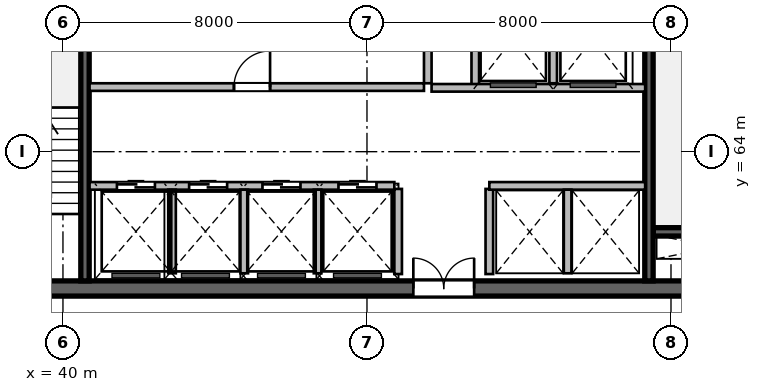
"""IFC4 building model, lengths in metres.
Left out: names, types, materials, properties, quantities, classifications, styles, units other than length and angle.
Written with IfcOpenShell. Run it as: python <this file> out.ifc"""

import sys

from ifc_helpers import new_model, si_unit, direction, frame, frame_2d, origin, place, context, subcontext, project, spatial, rectangle, extrude, source, transform, mapped, element, fill, save


model = new_model("IFC4")
c1 = context("Model", 3, precision=1e-05, world=origin(), true_north=direction((0.0, 1.0)))
c2 = subcontext(c1, "Body", "Model", "MODEL_VIEW")
j1 = project(units=[si_unit("LENGTHUNIT", "METRE"), si_unit("PLANEANGLEUNIT", "RADIAN")], contexts=[c1])
p1 = place(None, origin())
s1 = spatial("IfcSite", under=j1, at=p1, CompositionType="ELEMENT")
p2 = place(p1, origin())
s2 = spatial("IfcBuilding", under=s1, at=p2, CompositionType="ELEMENT")
p3 = place(p2, frame((0.0, 0.0, 291.3)))
s3 = spatial("IfcBuildingStorey", under=s2, at=p3, CompositionType="ELEMENT", Elevation=291.3)
m1 = source(origin(), c2, "Body", "SweptSolid", [
    extrude(rectangle(XDim=21.6, YDim=0.4, at=frame_2d((10.8, 0.0))), origin(), (0.0, 0.0, 1.0), 3.9),
])
p4 = place(p3, frame((37.2, 60.4, 0.0), z_axis=(0.0, 0.0, 1.0), x_axis=(1.0, 0.0, 0.0)))
e1 = element("IfcWall", 1, at=p4, inside=s3, PredefinedType="SHEAR", context=c2, shape_type="MappedRepresentation", body=[
    mapped(m1, transform((0.0, 0.0, 0.0), scale=1.0)),
])
p5 = place(p4, frame((1.1, 0.0, 0.0)))
e2 = element("IfcOpeningElement", 2, at=p5, cuts=e1, PredefinedType="OPENING", context=c2, shape_type="SweptSolid", body=[
    extrude(rectangle(XDim=1.15, YDim=2.15, at=frame_2d((0.575, 1.075))), frame((0.0, 0.21, 0.0), z_axis=(0.0, -1.0, 0.0), x_axis=(1.0, 0.0, 0.0)), (0.0, 0.0, 1.0), 0.42),
])
p6 = place(p4, frame((19.5, 0.0, 0.0)))
e3 = element("IfcOpeningElement", 3, at=p6, cuts=e1, PredefinedType="OPENING", context=c2, shape_type="SweptSolid", body=[
    extrude(rectangle(XDim=0.9, YDim=2.1, at=frame_2d((0.45, 1.05))), frame((0.0, 0.21, 0.0), z_axis=(0.0, -1.0, 0.0), x_axis=(1.0, 0.0, 0.0)), (0.0, 0.0, 1.0), 0.42),
])
p7 = place(p4, frame((12.02, 0.0, 0.0)))
e4 = element("IfcOpeningElement", 4, at=p7, cuts=e1, PredefinedType="OPENING", context=c2, shape_type="SweptSolid", body=[
    extrude(rectangle(XDim=1.6, YDim=2.15, at=frame_2d((0.8, 1.075))), frame((0.0, 0.21, 0.0), z_axis=(0.0, -1.0, 0.0), x_axis=(1.0, 0.0, 0.0)), (0.0, 0.0, 1.0), 0.42),
])
m2 = source(origin(), c2, "Body", "SweptSolid", [
    extrude(rectangle(XDim=3.27, YDim=0.22, at=frame_2d((1.635, 0.0))), origin(), (0.0, 0.0, 1.0), 3.9),
])
p8 = place(p3, frame((55.53, 61.89, 0.0), z_axis=(0.0, 0.0, 1.0), x_axis=(1.0, 0.0, 0.0)))
e5 = element("IfcWall", 5, at=p8, inside=s3, PredefinedType="SHEAR", context=c2, shape_type="MappedRepresentation", body=[
    mapped(m2, transform((0.0, 0.0, 0.0), scale=1.0)),
])
m3 = source(origin(), c2, "Body", "SweptSolid", [
    extrude(rectangle(XDim=11.2, YDim=0.22, at=frame_2d((5.6, 0.0))), origin(), (0.0, 0.0, 1.0), 3.9),
])
p9 = place(p3, frame((40.58, 60.6, 0.0), z_axis=(0.0, 0.0, 1.0), x_axis=(0.0, 1.0, 0.0)))
e6 = element("IfcWall", 6, at=p9, inside=s3, PredefinedType="SHEAR", context=c2, shape_type="MappedRepresentation", body=[
    mapped(m3, transform((0.0, 0.0, 0.0), scale=1.0)),
])
p10 = place(p3, frame((55.42, 60.6, 0.0), z_axis=(0.0, 0.0, 1.0), x_axis=(0.0, 1.0, 0.0)))
e7 = element("IfcWall", 7, at=p10, inside=s3, PredefinedType="SHEAR", context=c2, shape_type="MappedRepresentation", body=[
    mapped(m3, transform((0.0, 0.0, 0.0), scale=1.0)),
])
p11 = place(p10, frame((9.645, 0.0, 0.0)))
e8 = element("IfcOpeningElement", 8, at=p11, cuts=e7, PredefinedType="OPENING", context=c2, shape_type="SweptSolid", body=[
    extrude(rectangle(XDim=1.15, YDim=2.15, at=frame_2d((0.575, 1.075))), frame((0.0, 0.12, 0.0), z_axis=(0.0, -1.0, 0.0), x_axis=(1.0, 0.0, 0.0)), (0.0, 0.0, 1.0), 0.24),
])
m4 = source(origin(), c2, "Body", "SweptSolid", [
    extrude(rectangle(XDim=2.24, YDim=0.2, at=frame_2d((1.12, 0.0))), origin(), (0.0, 0.0, 1.0), 3.64),
])
for number, where, z_axis, x_axis in (
    (9, (48.82, 60.78, 0.0), (0.0, 0.0, 1.0), (0.0, 1.0, 0.0)),
    (10, (51.22, 60.78, 0.0), (0.0, 0.0, 1.0), (0.0, 1.0, 0.0)),
):
    element("IfcWall", number, at=place(p3, frame(where, z_axis=z_axis, x_axis=x_axis)), inside=s3, PredefinedType="SOLIDWALL", context=c2, shape_type="MappedRepresentation", body=[
        mapped(m4, transform((0.0, 0.0, 0.0), scale=1.0)),
    ])
m5 = source(origin(), c2, "Body", "SweptSolid", [
    extrude(rectangle(XDim=5.8, YDim=0.2, at=frame_2d((2.9, 0.0))), origin(), (0.0, 0.0, 1.0), 3.64),
])
p12 = place(p3, frame((49.6, 65.8, 0.0), z_axis=(0.0, 0.0, 1.0), x_axis=(0.0, 1.0, 0.0)))
e11 = element("IfcWall", 11, at=p12, inside=s3, PredefinedType="SOLIDWALL", context=c2, shape_type="MappedRepresentation", body=[
    mapped(m5, transform((0.0, 0.0, 0.0), scale=1.0)),
])
m6 = source(origin(), c2, "Body", "SweptSolid", [
    extrude(rectangle(XDim=2.58, YDim=0.2, at=frame_2d((1.29, 0.0))), origin(), (0.0, 0.0, 1.0), 3.64),
])
p13 = place(p3, frame((50.85, 65.68, 0.0), z_axis=(0.0, 0.0, 1.0), x_axis=(0.0, 1.0, 0.0)))
e12 = element("IfcWall", 12, at=p13, inside=s3, PredefinedType="SOLIDWALL", context=c2, shape_type="MappedRepresentation", body=[
    mapped(m6, transform((0.0, 0.0, 0.0), scale=1.0)),
])
m7 = source(origin(), c2, "Body", "SweptSolid", [
    extrude(rectangle(XDim=2.4, YDim=0.2, at=frame_2d((1.2, 0.0))), origin(), (0.0, 0.0, 1.0), 3.64),
])
p14 = place(p3, frame((52.9, 65.8, 0.0), z_axis=(0.0, 0.0, 1.0), x_axis=(0.0, 1.0, 0.0)))
e13 = element("IfcWall", 13, at=p14, inside=s3, PredefinedType="SOLIDWALL", context=c2, shape_type="MappedRepresentation", body=[
    mapped(m7, transform((0.0, 0.0, 0.0), scale=1.0)),
])
m8 = source(origin(), c2, "Body", "SweptSolid", [
    extrude(rectangle(XDim=5.62, YDim=0.2, at=frame_2d((2.81, 0.0))), origin(), (0.0, 0.0, 1.0), 3.64),
])
p15 = place(p3, frame((49.7, 65.68, 0.0), z_axis=(0.0, 0.0, 1.0), x_axis=(1.0, 0.0, 0.0)))
e14 = element("IfcWall", 14, at=p15, inside=s3, PredefinedType="SOLIDWALL", context=c2, shape_type="MappedRepresentation", body=[
    mapped(m8, transform((0.0, 0.0, 0.0), scale=1.0)),
])
m9 = source(origin(), c2, "Body", "SweptSolid", [
    extrude(rectangle(XDim=8.02, YDim=0.2, at=frame_2d((4.01, 0.0))), origin(), (0.0, 0.0, 1.0), 3.64),
])
p16 = place(p3, frame((40.7, 63.1, 0.0), z_axis=(0.0, 0.0, 1.0), x_axis=(1.0, 0.0, 0.0)))
e15 = element("IfcWall", 15, at=p16, inside=s3, PredefinedType="SOLIDWALL", context=c2, shape_type="MappedRepresentation", body=[
    mapped(m9, transform((0.0, 0.0, 0.0), scale=1.0)),
])
p17 = place(p16, frame((0.72, 0.0, 0.0)))
e16 = element("IfcOpeningElement", 16, at=p17, cuts=e15, PredefinedType="OPENING", context=c2, shape_type="SweptSolid", body=[
    extrude(rectangle(XDim=1.0, YDim=2.15, at=frame_2d((0.5, 1.075))), frame((0.0, 0.11, 0.0), z_axis=(0.0, -1.0, 0.0), x_axis=(1.0, 0.0, 0.0)), (0.0, 0.0, 1.0), 0.22),
])
p18 = place(p16, frame((2.62, 0.0, 0.0)))
e17 = element("IfcOpeningElement", 17, at=p18, cuts=e15, PredefinedType="OPENING", context=c2, shape_type="SweptSolid", body=[
    extrude(rectangle(XDim=1.0, YDim=2.15, at=frame_2d((0.5, 1.075))), frame((0.0, 0.11, 0.0), z_axis=(0.0, -1.0, 0.0), x_axis=(1.0, 0.0, 0.0)), (0.0, 0.0, 1.0), 0.22),
])
p19 = place(p16, frame((4.55, 0.0, 0.0)))
e18 = element("IfcOpeningElement", 18, at=p19, cuts=e15, PredefinedType="OPENING", context=c2, shape_type="SweptSolid", body=[
    extrude(rectangle(XDim=1.0, YDim=2.15, at=frame_2d((0.5, 1.075))), frame((0.0, 0.11, 0.0), z_axis=(0.0, -1.0, 0.0), x_axis=(1.0, 0.0, 0.0)), (0.0, 0.0, 1.0), 0.22),
])
p20 = place(p16, frame((6.55, 0.0, 0.0)))
e19 = element("IfcOpeningElement", 19, at=p20, cuts=e15, PredefinedType="OPENING", context=c2, shape_type="SweptSolid", body=[
    extrude(rectangle(XDim=1.0, YDim=2.15, at=frame_2d((0.5, 1.075))), frame((0.0, 0.11, 0.0), z_axis=(0.0, -1.0, 0.0), x_axis=(1.0, 0.0, 0.0)), (0.0, 0.0, 1.0), 0.22),
])
m10 = source(origin(), c2, "Body", "SweptSolid", [
    extrude(rectangle(XDim=4.1, YDim=0.2, at=frame_2d((2.05, 0.0))), origin(), (0.0, 0.0, 1.0), 3.64),
])
p21 = place(p3, frame((51.22, 63.1, 0.0), z_axis=(0.0, 0.0, 1.0), x_axis=(1.0, 0.0, 0.0)))
e20 = element("IfcWall", 20, at=p21, inside=s3, PredefinedType="SOLIDWALL", context=c2, shape_type="MappedRepresentation", body=[
    mapped(m10, transform((0.0, 0.0, 0.0), scale=1.0)),
])
m11 = source(origin(), c2, "Body", "SweptSolid", [
    extrude(rectangle(XDim=2.2, YDim=0.2, at=frame_2d((1.1, 0.0))), origin(), (0.0, 0.0, 1.0), 3.64),
])
for number, where, z_axis, x_axis in (
    (21, (42.87, 60.8, 0.0), (0.0, 0.0, 1.0), (0.0, 1.0, 0.0)),
    (22, (44.77, 60.8, 0.0), (0.0, 0.0, 1.0), (0.0, 1.0, 0.0)),
    (23, (46.7, 60.8, 0.0), (0.0, 0.0, 1.0), (0.0, 1.0, 0.0)),
    (24, (53.28, 60.8, 0.0), (0.0, 0.0, 1.0), (0.0, 1.0, 0.0)),
):
    element("IfcWall", number, at=place(p3, frame(where, z_axis=z_axis, x_axis=x_axis)), inside=s3, PredefinedType="SOLIDWALL", context=c2, shape_type="MappedRepresentation", body=[
        mapped(m11, transform((0.0, 0.0, 0.0), scale=1.0)),
    ])
m12 = source(origin(), c2, "Body", "SweptSolid", [
    extrude(rectangle(XDim=8.8, YDim=0.2, at=frame_2d((4.4, 0.0))), origin(), (0.0, 0.0, 1.0), 3.64),
])
p22 = place(p3, frame((40.7, 65.7, 0.0), z_axis=(0.0, 0.0, 1.0), x_axis=(1.0, 0.0, 0.0)))
e25 = element("IfcWall", 25, at=p22, inside=s3, PredefinedType="SOLIDWALL", context=c2, shape_type="MappedRepresentation", body=[
    mapped(m12, transform((0.0, 0.0, 0.0), scale=1.0)),
])
p23 = place(p22, frame((3.8, 0.0, 0.0)))
e26 = element("IfcOpeningElement", 26, at=p23, cuts=e25, PredefinedType="OPENING", context=c2, shape_type="SweptSolid", body=[
    extrude(rectangle(XDim=0.95, YDim=2.15, at=frame_2d((0.475, 1.075))), frame((0.0, 0.11, 0.0), z_axis=(0.0, -1.0, 0.0), x_axis=(1.0, 0.0, 0.0)), (0.0, 0.0, 1.0), 0.22),
])
m13 = source(origin(), c2, "Body", "SweptSolid", [
    extrude(rectangle(XDim=1.6, YDim=2.15, at=frame_2d((0.8, 1.075))), frame((0.0, 0.025, 0.0), z_axis=(0.0, -1.0, 0.0), x_axis=(1.0, 0.0, 0.0)), (0.0, 0.0, 1.0), 0.05),
])
p24 = place(p7, origin())
e27 = element("IfcDoor", 27, at=p24, inside=s3, OperationType="DOUBLE_DOOR_SINGLE_SWING", PredefinedType="DOOR", context=c2, shape_type="MappedRepresentation", body=[
    mapped(m13, transform((0.0, 0.0, 0.0), scale=1.0)),
])
fill(e4, e27)
m14 = source(origin(), c2, "Body", "SweptSolid", [
    extrude(rectangle(XDim=1.0, YDim=2.15, at=frame_2d((0.5, 1.075))), frame((0.0, 0.025, 0.0), z_axis=(0.0, -1.0, 0.0), x_axis=(1.0, 0.0, 0.0)), (0.0, 0.0, 1.0), 0.05),
])
p25 = place(p17, origin())
e28 = element("IfcDoor", 28, at=p25, inside=s3, OperationType="DOUBLE_DOOR_SLIDING", PredefinedType="DOOR", context=c2, shape_type="MappedRepresentation", body=[
    mapped(m14, transform((0.0, 0.0, 0.0), scale=1.0)),
])
fill(e16, e28)
p26 = place(p18, origin())
e29 = element("IfcDoor", 29, at=p26, inside=s3, OperationType="DOUBLE_DOOR_SLIDING", PredefinedType="DOOR", context=c2, shape_type="MappedRepresentation", body=[
    mapped(m14, transform((0.0, 0.0, 0.0), scale=1.0)),
])
fill(e17, e29)
p27 = place(p19, origin())
e30 = element("IfcDoor", 30, at=p27, inside=s3, OperationType="DOUBLE_DOOR_SLIDING", PredefinedType="DOOR", context=c2, shape_type="MappedRepresentation", body=[
    mapped(m14, transform((0.0, 0.0, 0.0), scale=1.0)),
])
fill(e18, e30)
p28 = place(p20, origin())
e31 = element("IfcDoor", 31, at=p28, inside=s3, OperationType="DOUBLE_DOOR_SLIDING", PredefinedType="DOOR", context=c2, shape_type="MappedRepresentation", body=[
    mapped(m14, transform((0.0, 0.0, 0.0), scale=1.0)),
])
fill(e19, e31)
m15 = source(origin(), c2, "Body", "SweptSolid", [
    extrude(rectangle(XDim=0.95, YDim=2.15, at=frame_2d((0.475, 1.075))), frame((0.0, 0.025, 0.0), z_axis=(0.0, -1.0, 0.0), x_axis=(1.0, 0.0, 0.0)), (0.0, 0.0, 1.0), 0.05),
])
p29 = place(p23, origin())
e32 = element("IfcDoor", 32, at=p29, inside=s3, OperationType="SINGLE_SWING_RIGHT", PredefinedType="DOOR", context=c2, shape_type="MappedRepresentation", body=[
    mapped(m15, transform((0.0, 0.0, 0.0), scale=1.0)),
])
fill(e26, e32)
save(model, sys.argv[1])
